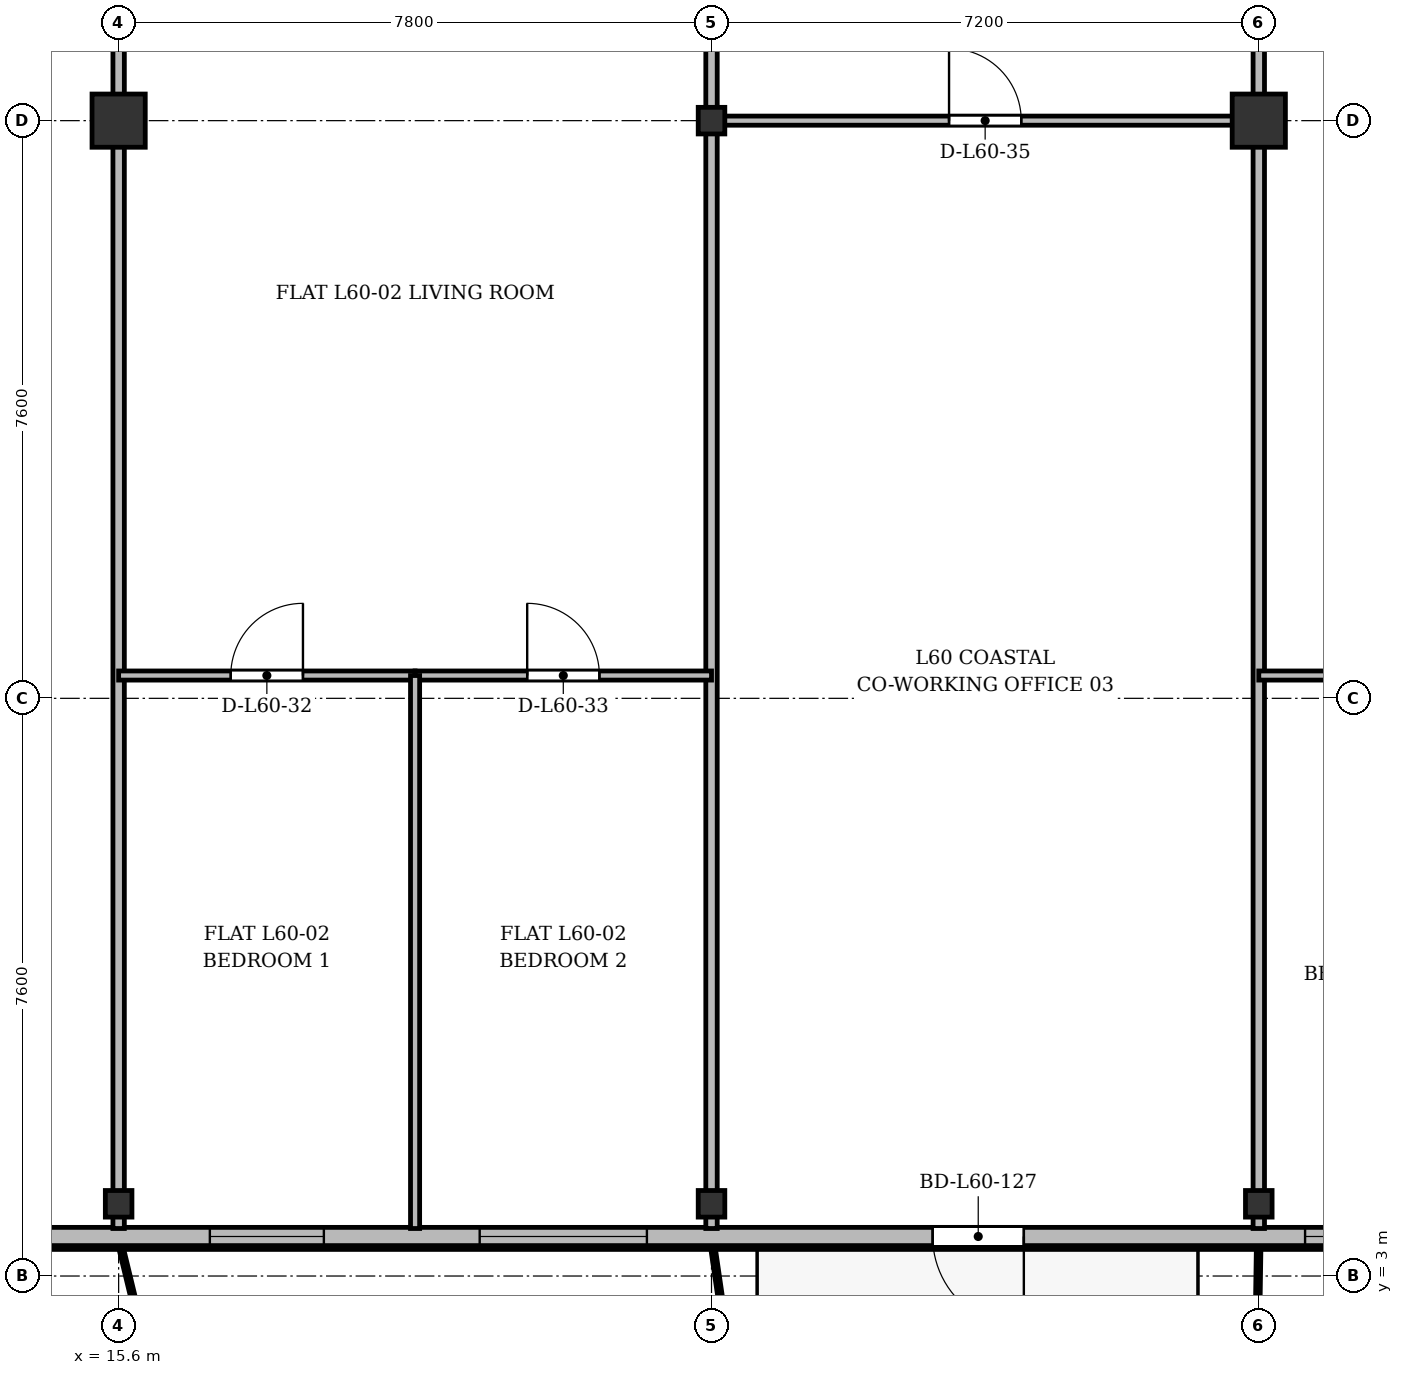
"""IFC4 building model, lengths in metres.
Left out: names, types, materials, properties, quantities, classifications, styles, units other than length and angle.
Written with IfcOpenShell. Run it as: python <this file> out.ifc"""

import sys

from ifc_helpers import new_model, si_unit, direction, frame, frame_2d, origin, origin_2d, place, context, subcontext, project, spatial, rectangle, i_section, extrude, source, transform, mapped, element, fill, save


model = new_model("IFC4")
c1 = context("Model", 3, precision=1e-05, world=origin(), true_north=direction((0.0, 1.0)))
c2 = subcontext(c1, "Body", "Model", "MODEL_VIEW")
j1 = project(units=[si_unit("LENGTHUNIT", "METRE"), si_unit("PLANEANGLEUNIT", "RADIAN")], contexts=[c1])
p1 = place(None, origin())
s1 = spatial("IfcSite", under=j1, at=p1, CompositionType="ELEMENT")
p2 = place(p1, origin())
s2 = spatial("IfcBuilding", under=s1, at=p2, CompositionType="ELEMENT")
p3 = place(p2, frame((0.0, 0.0, 230.1)))
s3 = spatial("IfcBuildingStorey", under=s2, at=p3, CompositionType="ELEMENT", Elevation=230.1)
m1 = source(origin(), c2, "Body", "SweptSolid", [
    extrude(i_section(OverallWidth=0.35, OverallDepth=0.35, WebThickness=0.018, FlangeThickness=0.028, at=origin_2d()), origin(), (0.0, 0.0, 1.0), 3.6),
])
p4 = place(p3, frame((15.6, 3.95, 0.0), z_axis=(0.0, 0.0, 1.0), x_axis=(1.0, 0.0, 0.0)))
e1 = element("IfcColumn", 1, at=p4, inside=s3, PredefinedType="COLUMN", context=c2, shape_type="MappedRepresentation", body=[
    mapped(m1, transform((0.0, 0.0, 0.0), x_axis=(1.0, 0.0, 0.0), y_axis=(0.0, 1.0, 0.0), z_axis=(0.0, 0.0, 1.0), scale=1.0)),
])
m2 = source(origin(), c2, "Body", "SweptSolid", [
    extrude(rectangle(XDim=0.7, YDim=0.7, at=origin_2d()), origin(), (0.0, 0.0, 1.0), 3.6),
])
p5 = place(p3, frame((15.6, 18.2, 0.0), z_axis=(0.0, 0.0, 1.0), x_axis=(1.0, 0.0, 0.0)))
e2 = element("IfcColumn", 2, at=p5, inside=s3, PredefinedType="COLUMN", context=c2, shape_type="MappedRepresentation", body=[
    mapped(m2, transform((0.0, 0.0, 0.0), x_axis=(1.0, 0.0, 0.0), y_axis=(0.0, 1.0, 0.0), z_axis=(0.0, 0.0, 1.0), scale=1.0)),
])
for number, where, z_axis, x_axis in (
    (3, (23.4, 3.95, 0.0), (0.0, 0.0, 1.0), (1.0, 0.0, 0.0)),
    (4, (23.4, 18.2, 0.0), (0.0, 0.0, 1.0), (1.0, 0.0, 0.0)),
    (5, (30.6, 3.95, 0.0), (0.0, 0.0, 1.0), (1.0, 0.0, 0.0)),
):
    element("IfcColumn", number, at=place(p3, frame(where, z_axis=z_axis, x_axis=x_axis)), inside=s3, PredefinedType="COLUMN", context=c2, shape_type="MappedRepresentation", body=[
        mapped(m1, transform((0.0, 0.0, 0.0), x_axis=(1.0, 0.0, 0.0), y_axis=(0.0, 1.0, 0.0), z_axis=(0.0, 0.0, 1.0), scale=1.0)),
    ])
p6 = place(p3, frame((30.6, 18.2, 0.0), z_axis=(0.0, 0.0, 1.0), x_axis=(1.0, 0.0, 0.0)))
e6 = element("IfcColumn", 6, at=p6, inside=s3, PredefinedType="COLUMN", context=c2, shape_type="MappedRepresentation", body=[
    mapped(m2, transform((0.0, 0.0, 0.0), x_axis=(1.0, 0.0, 0.0), y_axis=(0.0, 1.0, 0.0), z_axis=(0.0, 0.0, 1.0), scale=1.0)),
])
p7 = place(p3, frame((44.8, 3.52, 0.0), z_axis=(0.0, 0.0, 1.0), x_axis=(-1.0, 0.0, 0.0)))
e7 = element("IfcWall", 7, at=p7, inside=s3, PredefinedType="SOLIDWALL", context=c2, shape_type="SweptSolid", body=[
    extrude(rectangle(XDim=33.8, YDim=0.24, at=frame_2d((16.9, 0.0))), origin(), (0.0, 0.0, 1.0), 3.36),
])
p8 = place(p7, frame((2.2, 0.0, 0.9)))
e8 = element("IfcOpeningElement", 8, at=p8, cuts=e7, PredefinedType="OPENING", context=c2, shape_type="SweptSolid", body=[
    extrude(rectangle(XDim=2.2, YDim=1.8, at=frame_2d((1.1, 0.9))), frame((0.0, 0.13, 0.0), z_axis=(0.0, -1.0, 0.0), x_axis=(1.0, 0.0, 0.0)), (0.0, 0.0, 1.0), 0.26),
])
p9 = place(p7, frame((6.284, 0.0, 0.9)))
e9 = element("IfcOpeningElement", 9, at=p9, cuts=e7, PredefinedType="OPENING", context=c2, shape_type="SweptSolid", body=[
    extrude(rectangle(XDim=1.5, YDim=1.75, at=frame_2d((0.75, 0.875))), frame((0.0, 0.13, 0.0), z_axis=(0.0, -1.0, 0.0), x_axis=(1.0, 0.0, 0.0)), (0.0, 0.0, 1.0), 0.26),
])
p10 = place(p7, frame((8.9, 0.0, 0.9)))
e10 = element("IfcOpeningElement", 10, at=p10, cuts=e7, PredefinedType="OPENING", context=c2, shape_type="SweptSolid", body=[
    extrude(rectangle(XDim=2.0, YDim=1.95, at=frame_2d((1.0, 0.975))), frame((0.0, 0.13, 0.0), z_axis=(0.0, -1.0, 0.0), x_axis=(1.0, 0.0, 0.0)), (0.0, 0.0, 1.0), 0.26),
])
p11 = place(p7, frame((11.941, 0.0, 0.9)))
e11 = element("IfcOpeningElement", 11, at=p11, cuts=e7, PredefinedType="OPENING", context=c2, shape_type="SweptSolid", body=[
    extrude(rectangle(XDim=1.65, YDim=1.85, at=frame_2d((0.825, 0.925))), frame((0.0, 0.13, 0.0), z_axis=(0.0, -1.0, 0.0), x_axis=(1.0, 0.0, 0.0)), (0.0, 0.0, 1.0), 0.26),
])
p12 = place(p7, frame((17.291, 0.0, 0.0)))
e12 = element("IfcOpeningElement", 12, at=p12, cuts=e7, PredefinedType="OPENING", context=c2, shape_type="SweptSolid", body=[
    extrude(rectangle(XDim=1.2, YDim=2.2, at=frame_2d((0.6, 1.1))), frame((0.0, 0.13, 0.0), z_axis=(0.0, -1.0, 0.0), x_axis=(1.0, 0.0, 0.0)), (0.0, 0.0, 1.0), 0.26),
])
p13 = place(p7, frame((22.25, 0.0, 0.9)))
e13 = element("IfcOpeningElement", 13, at=p13, cuts=e7, PredefinedType="OPENING", context=c2, shape_type="SweptSolid", body=[
    extrude(rectangle(XDim=2.2, YDim=1.8, at=frame_2d((1.1, 0.9))), frame((0.0, 0.13, 0.0), z_axis=(0.0, -1.0, 0.0), x_axis=(1.0, 0.0, 0.0)), (0.0, 0.0, 1.0), 0.26),
])
p14 = place(p7, frame((26.5, 0.0, 0.9)))
e14 = element("IfcOpeningElement", 14, at=p14, cuts=e7, PredefinedType="OPENING", context=c2, shape_type="SweptSolid", body=[
    extrude(rectangle(XDim=1.5, YDim=1.75, at=frame_2d((0.75, 0.875))), frame((0.0, 0.13, 0.0), z_axis=(0.0, -1.0, 0.0), x_axis=(1.0, 0.0, 0.0)), (0.0, 0.0, 1.0), 0.26),
])
p15 = place(p7, frame((30.455, 0.0, 0.9)))
e15 = element("IfcOpeningElement", 15, at=p15, cuts=e7, PredefinedType="OPENING", context=c2, shape_type="SweptSolid", body=[
    extrude(rectangle(XDim=2.0, YDim=1.95, at=frame_2d((1.0, 0.975))), frame((0.0, 0.13, 0.0), z_axis=(0.0, -1.0, 0.0), x_axis=(1.0, 0.0, 0.0)), (0.0, 0.0, 1.0), 0.26),
])
for number, where, z_axis, x_axis in (
    (16, (15.6, 3.625, 0.0), (0.0, 0.0, 1.0), (0.0, 1.0, 0.0)),
    (17, (23.4, 3.625, 0.0), (0.0, 0.0, 1.0), (0.0, 1.0, 0.0)),
    (18, (30.6, 3.625, 0.0), (0.0, 0.0, 1.0), (0.0, 1.0, 0.0)),
):
    element("IfcWall", number, at=place(p3, frame(where, z_axis=z_axis, x_axis=x_axis)), inside=s3, PredefinedType="PARTITIONING", context=c2, shape_type="SweptSolid", body=[
        extrude(rectangle(XDim=27.375, YDim=0.15, at=frame_2d((13.688, 0.0))), origin(), (0.0, 0.0, 1.0), 2.86),
    ])
p16 = place(p3, frame((15.6, 10.9, 0.0), z_axis=(0.0, 0.0, 1.0), x_axis=(1.0, 0.0, 0.0)))
e19 = element("IfcWall", 19, at=p16, inside=s3, PredefinedType="PARTITIONING", context=c2, shape_type="SweptSolid", body=[
    extrude(rectangle(XDim=3.9, YDim=0.12, at=frame_2d((1.95, 0.0))), origin(), (0.0, 0.0, 1.0), 2.86),
])
p17 = place(p16, frame((1.475, 0.0, 0.0)))
e20 = element("IfcOpeningElement", 20, at=p17, cuts=e19, PredefinedType="OPENING", context=c2, shape_type="SweptSolid", body=[
    extrude(rectangle(XDim=0.95, YDim=2.15, at=frame_2d((0.475, 1.075))), frame((0.0, 0.07, 0.0), z_axis=(0.0, -1.0, 0.0), x_axis=(1.0, 0.0, 0.0)), (0.0, 0.0, 1.0), 0.14),
])
p18 = place(p3, frame((19.5, 10.9, 0.0), z_axis=(0.0, 0.0, 1.0), x_axis=(1.0, 0.0, 0.0)))
e21 = element("IfcWall", 21, at=p18, inside=s3, PredefinedType="PARTITIONING", context=c2, shape_type="SweptSolid", body=[
    extrude(rectangle(XDim=3.9, YDim=0.12, at=frame_2d((1.95, 0.0))), origin(), (0.0, 0.0, 1.0), 2.86),
])
p19 = place(p18, frame((1.475, 0.0, 0.0)))
e22 = element("IfcOpeningElement", 22, at=p19, cuts=e21, PredefinedType="OPENING", context=c2, shape_type="SweptSolid", body=[
    extrude(rectangle(XDim=0.95, YDim=2.15, at=frame_2d((0.475, 1.075))), frame((0.0, 0.07, 0.0), z_axis=(0.0, -1.0, 0.0), x_axis=(1.0, 0.0, 0.0)), (0.0, 0.0, 1.0), 0.14),
])
p20 = place(p3, frame((19.5, 3.625, 0.0), z_axis=(0.0, 0.0, 1.0), x_axis=(0.0, 1.0, 0.0)))
e23 = element("IfcWall", 23, at=p20, inside=s3, PredefinedType="PARTITIONING", context=c2, shape_type="SweptSolid", body=[
    extrude(rectangle(XDim=7.275, YDim=0.12, at=frame_2d((3.637, 0.0))), origin(), (0.0, 0.0, 1.0), 2.91),
])
p21 = place(p3, frame((23.4, 18.2, 0.0), z_axis=(0.0, 0.0, 1.0), x_axis=(1.0, 0.0, 0.0)))
e24 = element("IfcWall", 24, at=p21, inside=s3, PredefinedType="PARTITIONING", context=c2, shape_type="SweptSolid", body=[
    extrude(rectangle(XDim=7.2, YDim=0.12, at=frame_2d((3.6, 0.0))), origin(), (0.0, 0.0, 1.0), 2.91),
])
p22 = place(p21, frame((3.125, 0.0, 0.0)))
e25 = element("IfcOpeningElement", 25, at=p22, cuts=e24, PredefinedType="OPENING", context=c2, shape_type="SweptSolid", body=[
    extrude(rectangle(XDim=0.95, YDim=2.15, at=frame_2d((0.475, 1.075))), frame((0.0, 0.07, 0.0), z_axis=(0.0, -1.0, 0.0), x_axis=(1.0, 0.0, 0.0)), (0.0, 0.0, 1.0), 0.14),
])
p23 = place(p3, frame((30.6, 10.9, 0.0), z_axis=(0.0, 0.0, 1.0), x_axis=(1.0, 0.0, 0.0)))
e26 = element("IfcWall", 26, at=p23, inside=s3, PredefinedType="PARTITIONING", context=c2, shape_type="SweptSolid", body=[
    extrude(rectangle(XDim=2.867, YDim=0.12, at=frame_2d((1.434, 0.0))), origin(), (0.0, 0.0, 1.0), 2.86),
])
p24 = place(p23, frame((0.958, 0.0, 0.0)))
e27 = element("IfcOpeningElement", 27, at=p24, cuts=e26, PredefinedType="OPENING", context=c2, shape_type="SweptSolid", body=[
    extrude(rectangle(XDim=0.95, YDim=2.15, at=frame_2d((0.475, 1.075))), frame((0.0, 0.07, 0.0), z_axis=(0.0, -1.0, 0.0), x_axis=(1.0, 0.0, 0.0)), (0.0, 0.0, 1.0), 0.14),
])
m3 = source(origin(), c2, "Body", "SweptSolid", [
    extrude(rectangle(XDim=1.65, YDim=1.85, at=frame_2d((0.825, 0.925))), frame((0.0, 0.03, 0.0), z_axis=(0.0, -1.0, 0.0), x_axis=(1.0, 0.0, 0.0)), (0.0, 0.0, 1.0), 0.06),
])
p25 = place(p11, origin())
e28 = element("IfcWindow", 28, at=p25, inside=s3, PartitioningType="SINGLE_PANEL", PredefinedType="WINDOW", context=c2, shape_type="MappedRepresentation", body=[
    mapped(m3, transform((0.0, 0.0, 0.0), x_axis=(1.0, 0.0, 0.0), y_axis=(0.0, 1.0, 0.0), z_axis=(0.0, 0.0, 1.0), scale=1.0)),
])
fill(e11, e28)
m4 = source(origin(), c2, "Body", "SweptSolid", [
    extrude(rectangle(XDim=1.2, YDim=2.2, at=frame_2d((0.6, 1.1))), frame((0.0, 0.025, 0.0), z_axis=(0.0, -1.0, 0.0), x_axis=(1.0, 0.0, 0.0)), (0.0, 0.0, 1.0), 0.05),
])
p26 = place(p12, origin())
e29 = element("IfcDoor", 29, at=p26, inside=s3, OperationType="SINGLE_SWING_LEFT", PredefinedType="DOOR", context=c2, shape_type="MappedRepresentation", body=[
    mapped(m4, transform((0.0, 0.0, 0.0), x_axis=(1.0, 0.0, 0.0), y_axis=(0.0, 1.0, 0.0), z_axis=(0.0, 0.0, 1.0), scale=1.0)),
])
fill(e12, e29)
m5 = source(origin(), c2, "Body", "SweptSolid", [
    extrude(rectangle(XDim=2.2, YDim=1.8, at=frame_2d((1.1, 0.9))), frame((0.0, 0.03, 0.0), z_axis=(0.0, -1.0, 0.0), x_axis=(1.0, 0.0, 0.0)), (0.0, 0.0, 1.0), 0.06),
])
p27 = place(p13, origin())
e30 = element("IfcWindow", 30, at=p27, inside=s3, PartitioningType="SINGLE_PANEL", PredefinedType="WINDOW", context=c2, shape_type="MappedRepresentation", body=[
    mapped(m5, transform((0.0, 0.0, 0.0), x_axis=(1.0, 0.0, 0.0), y_axis=(0.0, 1.0, 0.0), z_axis=(0.0, 0.0, 1.0), scale=1.0)),
])
fill(e13, e30)
m6 = source(origin(), c2, "Body", "SweptSolid", [
    extrude(rectangle(XDim=1.5, YDim=1.75, at=frame_2d((0.75, 0.875))), frame((0.0, 0.03, 0.0), z_axis=(0.0, -1.0, 0.0), x_axis=(1.0, 0.0, 0.0)), (0.0, 0.0, 1.0), 0.06),
])
p28 = place(p14, origin())
e31 = element("IfcWindow", 31, at=p28, inside=s3, PartitioningType="SINGLE_PANEL", PredefinedType="WINDOW", context=c2, shape_type="MappedRepresentation", body=[
    mapped(m6, transform((0.0, 0.0, 0.0), x_axis=(1.0, 0.0, 0.0), y_axis=(0.0, 1.0, 0.0), z_axis=(0.0, 0.0, 1.0), scale=1.0)),
])
fill(e14, e31)
m7 = source(origin(), c2, "Body", "SweptSolid", [
    extrude(rectangle(XDim=0.95, YDim=2.15, at=frame_2d((0.475, 1.075))), frame((0.0, 0.025, 0.0), z_axis=(0.0, -1.0, 0.0), x_axis=(1.0, 0.0, 0.0)), (0.0, 0.0, 1.0), 0.05),
])
p29 = place(p17, origin())
e32 = element("IfcDoor", 32, at=p29, inside=s3, OperationType="SINGLE_SWING_RIGHT", PredefinedType="DOOR", context=c2, shape_type="MappedRepresentation", body=[
    mapped(m7, transform((0.0, 0.0, 0.0), x_axis=(1.0, 0.0, 0.0), y_axis=(0.0, 1.0, 0.0), z_axis=(0.0, 0.0, 1.0), scale=1.0)),
])
fill(e20, e32)
p30 = place(p19, origin())
e33 = element("IfcDoor", 33, at=p30, inside=s3, OperationType="SINGLE_SWING_LEFT", PredefinedType="DOOR", context=c2, shape_type="MappedRepresentation", body=[
    mapped(m7, transform((0.0, 0.0, 0.0), x_axis=(1.0, 0.0, 0.0), y_axis=(0.0, 1.0, 0.0), z_axis=(0.0, 0.0, 1.0), scale=1.0)),
])
fill(e22, e33)
p31 = place(p22, origin())
e34 = element("IfcDoor", 34, at=p31, inside=s3, OperationType="SINGLE_SWING_LEFT", PredefinedType="DOOR", context=c2, shape_type="MappedRepresentation", body=[
    mapped(m7, transform((0.0, 0.0, 0.0), x_axis=(1.0, 0.0, 0.0), y_axis=(0.0, 1.0, 0.0), z_axis=(0.0, 0.0, 1.0), scale=1.0)),
])
fill(e25, e34)
save(model, sys.argv[1])
